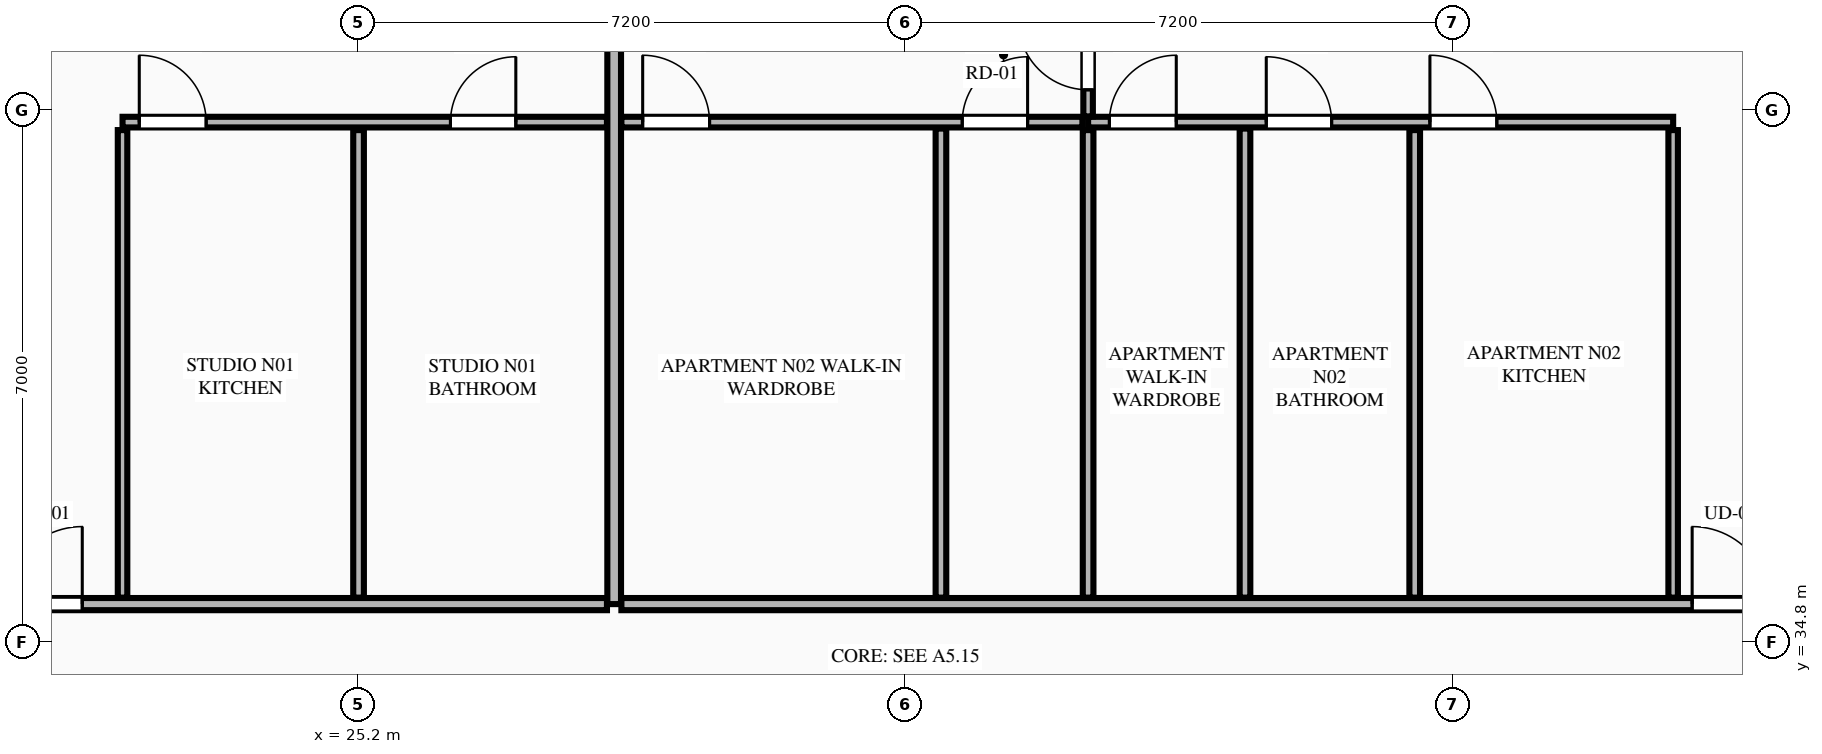
"""IFC4 building model, lengths in metres.
Left out: names, types, materials, properties, quantities, classifications, styles, units other than length and angle.
Written with IfcOpenShell. Run it as: python <this file> out.ifc"""

import sys

from ifc_helpers import new_model, si_unit, direction, frame, frame_2d, origin, place, context, subcontext, project, spatial, rectangle, extrude, element, fill, save


model = new_model("IFC4")
c1 = context("Model", 3, precision=1e-05, world=origin(), true_north=direction((0.0, 1.0)))
c2 = subcontext(c1, "Body", "Model", "MODEL_VIEW")
j1 = project(units=[si_unit("LENGTHUNIT", "METRE"), si_unit("PLANEANGLEUNIT", "RADIAN")], contexts=[c1])
p1 = place(None, origin())
s1 = spatial("IfcSite", under=j1, at=p1, CompositionType="ELEMENT")
p2 = place(p1, origin())
s2 = spatial("IfcBuilding", under=s1, at=p2, CompositionType="ELEMENT")
p3 = place(p2, frame((0.0, 0.0, 137.45)))
s3 = spatial("IfcBuildingStorey", under=s2, at=p3, CompositionType="ELEMENT", Elevation=137.45)
p4 = place(p3, frame((28.568, 35.3, 0.0), z_axis=(0.0, 0.0, 1.0), x_axis=(0.0, 1.0, 0.0)))
e1 = element("IfcWall", 1, at=p4, inside=s3, PredefinedType="PARTITIONING", context=c2, shape_type="SweptSolid", body=[
    extrude(rectangle(XDim=12.195, YDim=0.18, at=frame_2d((6.098, 0.0))), origin(), (0.0, 0.0, 1.0), 2.722),
])
p5 = place(p3, frame((20.145, 35.3, 0.0), z_axis=(0.0, 0.0, 1.0), x_axis=(1.0, 0.0, 0.0)))
e2 = element("IfcWall", 2, at=p5, inside=s3, PredefinedType="PARTITIONING", context=c2, shape_type="SweptSolid", body=[
    extrude(rectangle(XDim=8.328, YDim=0.16, at=frame_2d((4.164, 0.0))), origin(), (0.0, 0.0, 1.0), 3.34),
])
p6 = place(p5, frame((0.405, 0.0, 0.0)))
e3 = element("IfcOpeningElement", 3, at=p6, cuts=e2, PredefinedType="OPENING", context=c2, shape_type="SweptSolid", body=[
    extrude(rectangle(XDim=1.02, YDim=2.25, at=frame_2d((0.51, 1.125))), frame((0.0, 0.09, 0.0), z_axis=(0.0, -1.0, 0.0), x_axis=(1.0, 0.0, 0.0)), (0.0, 0.0, 1.0), 0.18),
])
p7 = place(p3, frame((22.1, 35.385, 0.0), z_axis=(0.0, 0.0, 1.0), x_axis=(0.0, 1.0, 0.0)))
e4 = element("IfcWall", 4, at=p7, inside=s3, PredefinedType="PARTITIONING", context=c2, shape_type="SweptSolid", body=[
    extrude(rectangle(XDim=6.151, YDim=0.125, at=frame_2d((3.075, 0.0))), origin(), (0.0, 0.0, 1.0), 2.722),
])
p8 = place(p3, frame((22.1, 41.641, 0.0), z_axis=(0.0, 0.0, 1.0), x_axis=(1.0, 0.0, 0.0)))
e5 = element("IfcWall", 5, at=p8, inside=s3, PredefinedType="PLUMBINGWALL", context=c2, shape_type="SweptSolid", body=[
    extrude(rectangle(XDim=6.373, YDim=0.14, at=frame_2d((3.187, 0.0))), origin(), (0.0, 0.0, 1.0), 3.34),
])
p9 = place(p8, frame((4.314, 0.0, 0.0)))
e6 = element("IfcOpeningElement", 6, at=p9, cuts=e5, PredefinedType="OPENING", context=c2, shape_type="SweptSolid", body=[
    extrude(rectangle(XDim=0.86, YDim=2.1, at=frame_2d((0.43, 1.05))), frame((0.0, 0.08, 0.0), z_axis=(0.0, -1.0, 0.0), x_axis=(1.0, 0.0, 0.0)), (0.0, 0.0, 1.0), 0.16),
])
p10 = place(p8, frame((0.22, 0.0, 0.0)))
e7 = element("IfcOpeningElement", 7, at=p10, cuts=e5, PredefinedType="OPENING", context=c2, shape_type="SweptSolid", body=[
    extrude(rectangle(XDim=0.88, YDim=2.15, at=frame_2d((0.44, 1.075))), frame((0.0, 0.08, 0.0), z_axis=(0.0, -1.0, 0.0), x_axis=(1.0, 0.0, 0.0)), (0.0, 0.0, 1.0), 0.16),
])
p11 = place(p3, frame((25.205, 35.385, 0.0), z_axis=(0.0, 0.0, 1.0), x_axis=(0.0, 1.0, 0.0)))
e8 = element("IfcWall", 8, at=p11, inside=s3, PredefinedType="PLUMBINGWALL", context=c2, shape_type="SweptSolid", body=[
    extrude(rectangle(XDim=6.151, YDim=0.14, at=frame_2d((3.075, 0.0))), origin(), (0.0, 0.0, 1.0), 3.34),
])
p12 = place(p3, frame((28.663, 35.3, 0.0), z_axis=(0.0, 0.0, 1.0), x_axis=(1.0, 0.0, 0.0)))
e9 = element("IfcWall", 9, at=p12, inside=s3, PredefinedType="PARTITIONING", context=c2, shape_type="SweptSolid", body=[
    extrude(rectangle(XDim=15.992, YDim=0.16, at=frame_2d((7.996, 0.0))), origin(), (0.0, 0.0, 1.0), 3.34),
])
p13 = place(p12, frame((14.087, 0.0, 0.0)))
e10 = element("IfcOpeningElement", 10, at=p13, cuts=e9, PredefinedType="OPENING", context=c2, shape_type="SweptSolid", body=[
    extrude(rectangle(XDim=1.02, YDim=2.25, at=frame_2d((0.51, 1.125))), frame((0.0, 0.09, 0.0), z_axis=(0.0, -1.0, 0.0), x_axis=(1.0, 0.0, 0.0)), (0.0, 0.0, 1.0), 0.18),
])
p14 = place(p3, frame((42.5, 35.385, 0.0), z_axis=(0.0, 0.0, 1.0), x_axis=(0.0, 1.0, 0.0)))
e11 = element("IfcWall", 11, at=p14, inside=s3, PredefinedType="PARTITIONING", context=c2, shape_type="SweptSolid", body=[
    extrude(rectangle(XDim=6.151, YDim=0.125, at=frame_2d((3.075, 0.0))), origin(), (0.0, 0.0, 1.0), 2.722),
])
p15 = place(p3, frame((34.803, 41.641, 0.0), z_axis=(0.0, 0.0, 1.0), x_axis=(1.0, 0.0, 0.0)))
e12 = element("IfcWall", 12, at=p15, inside=s3, PredefinedType="PLUMBINGWALL", context=c2, shape_type="SweptSolid", body=[
    extrude(rectangle(XDim=7.697, YDim=0.14, at=frame_2d((3.849, 0.0))), origin(), (0.0, 0.0, 1.0), 3.34),
])
p16 = place(p15, frame((0.28, 0.0, 0.0)))
e13 = element("IfcOpeningElement", 13, at=p16, cuts=e12, PredefinedType="OPENING", context=c2, shape_type="SweptSolid", body=[
    extrude(rectangle(XDim=0.88, YDim=2.15, at=frame_2d((0.44, 1.075))), frame((0.0, 0.08, 0.0), z_axis=(0.0, -1.0, 0.0), x_axis=(1.0, 0.0, 0.0)), (0.0, 0.0, 1.0), 0.16),
])
p17 = place(p15, frame((2.344, 0.0, 0.0)))
e14 = element("IfcOpeningElement", 14, at=p17, cuts=e12, PredefinedType="OPENING", context=c2, shape_type="SweptSolid", body=[
    extrude(rectangle(XDim=0.86, YDim=2.1, at=frame_2d((0.43, 1.05))), frame((0.0, 0.08, 0.0), z_axis=(0.0, -1.0, 0.0), x_axis=(1.0, 0.0, 0.0)), (0.0, 0.0, 1.0), 0.16),
])
p18 = place(p15, frame((4.497, 0.0, 0.0)))
e15 = element("IfcOpeningElement", 15, at=p18, cuts=e12, PredefinedType="OPENING", context=c2, shape_type="SweptSolid", body=[
    extrude(rectangle(XDim=0.88, YDim=2.15, at=frame_2d((0.44, 1.075))), frame((0.0, 0.08, 0.0), z_axis=(0.0, -1.0, 0.0), x_axis=(1.0, 0.0, 0.0)), (0.0, 0.0, 1.0), 0.16),
])
p19 = place(p3, frame((28.663, 41.641, 0.0), z_axis=(0.0, 0.0, 1.0), x_axis=(1.0, 0.0, 0.0)))
e16 = element("IfcWall", 16, at=p19, inside=s3, PredefinedType="PLUMBINGWALL", context=c2, shape_type="SweptSolid", body=[
    extrude(rectangle(XDim=6.065, YDim=0.14, at=frame_2d((3.032, 0.0))), origin(), (0.0, 0.0, 1.0), 3.34),
])
p20 = place(p19, frame((0.28, 0.0, 0.0)))
e17 = element("IfcOpeningElement", 17, at=p20, cuts=e16, PredefinedType="OPENING", context=c2, shape_type="SweptSolid", body=[
    extrude(rectangle(XDim=0.88, YDim=2.15, at=frame_2d((0.44, 1.075))), frame((0.0, 0.08, 0.0), z_axis=(0.0, -1.0, 0.0), x_axis=(1.0, 0.0, 0.0)), (0.0, 0.0, 1.0), 0.16),
])
p21 = place(p19, frame((4.484, 0.0, 0.0)))
e18 = element("IfcOpeningElement", 18, at=p21, cuts=e16, PredefinedType="OPENING", context=c2, shape_type="SweptSolid", body=[
    extrude(rectangle(XDim=0.86, YDim=2.1, at=frame_2d((0.43, 1.05))), frame((0.0, 0.08, 0.0), z_axis=(0.0, -1.0, 0.0), x_axis=(1.0, 0.0, 0.0)), (0.0, 0.0, 1.0), 0.16),
])
for number, where, z_axis, x_axis in (
    (19, (39.1, 35.385, 0.0), (0.0, 0.0, 1.0), (0.0, 1.0, 0.0)),
    (20, (34.803, 35.385, 0.0), (0.0, 0.0, 1.0), (0.0, 1.0, 0.0)),
):
    element("IfcWall", number, at=place(p3, frame(where, z_axis=z_axis, x_axis=x_axis)), inside=s3, PredefinedType="PLUMBINGWALL", context=c2, shape_type="SweptSolid", body=[
        extrude(rectangle(XDim=6.151, YDim=0.14, at=frame_2d((3.075, 0.0))), origin(), (0.0, 0.0, 1.0), 3.34),
    ])
p22 = place(p3, frame((34.803, 41.716, 0.0), z_axis=(0.0, 0.0, 1.0), x_axis=(0.0, 1.0, 0.0)))
e21 = element("IfcWall", 21, at=p22, inside=s3, PredefinedType="PARTITIONING", context=c2, shape_type="SweptSolid", body=[
    extrude(rectangle(XDim=5.869, YDim=0.125, at=frame_2d((2.935, 0.0))), origin(), (0.0, 0.0, 1.0), 3.34),
])
p23 = place(p22, frame((0.35, 0.0, 0.0)))
e22 = element("IfcOpeningElement", 22, at=p23, cuts=e21, PredefinedType="OPENING", context=c2, shape_type="SweptSolid", body=[
    extrude(rectangle(XDim=0.92, YDim=2.15, at=frame_2d((0.46, 1.075))), frame((0.0, 0.073, 0.0), z_axis=(0.0, -1.0, 0.0), x_axis=(1.0, 0.0, 0.0)), (0.0, 0.0, 1.0), 0.145),
])
for number, where, z_axis, x_axis in (
    (23, (36.867, 35.385, 0.0), (0.0, 0.0, 1.0), (0.0, 1.0, 0.0)),
    (24, (32.867, 35.385, 0.0), (0.0, 0.0, 1.0), (0.0, 1.0, 0.0)),
):
    element("IfcWall", number, at=place(p3, frame(where, z_axis=z_axis, x_axis=x_axis)), inside=s3, PredefinedType="PLUMBINGWALL", context=c2, shape_type="SweptSolid", body=[
        extrude(rectangle(XDim=6.171, YDim=0.14, at=frame_2d((3.085, 0.0))), origin(), (0.0, 0.0, 1.0), 3.34),
    ])
p24 = place(p9, origin())
e25 = element("IfcDoor", 25, at=p24, inside=s3, OperationType="SINGLE_SWING_RIGHT", PredefinedType="DOOR", context=c2, shape_type="SweptSolid", body=[
    extrude(rectangle(XDim=0.86, YDim=2.1, at=frame_2d((0.43, 1.05))), frame((0.0, 0.025, 0.0), z_axis=(0.0, -1.0, 0.0), x_axis=(1.0, 0.0, 0.0)), (0.0, 0.0, 1.0), 0.05),
])
fill(e6, e25)
p25 = place(p6, origin())
e26 = element("IfcDoor", 26, at=p25, inside=s3, OperationType="SINGLE_SWING_RIGHT", PredefinedType="DOOR", context=c2, shape_type="SweptSolid", body=[
    extrude(rectangle(XDim=1.02, YDim=2.25, at=frame_2d((0.51, 1.125))), frame((0.0, 0.025, 0.0), z_axis=(0.0, -1.0, 0.0), x_axis=(1.0, 0.0, 0.0)), (0.0, 0.0, 1.0), 0.05),
])
fill(e3, e26)
p26 = place(p10, origin())
e27 = element("IfcDoor", 27, at=p26, inside=s3, OperationType="SINGLE_SWING_LEFT", PredefinedType="DOOR", context=c2, shape_type="SweptSolid", body=[
    extrude(rectangle(XDim=0.88, YDim=2.15, at=frame_2d((0.44, 1.075))), frame((0.0, 0.025, 0.0), z_axis=(0.0, -1.0, 0.0), x_axis=(1.0, 0.0, 0.0)), (0.0, 0.0, 1.0), 0.05),
])
fill(e7, e27)
p27 = place(p16, origin())
e28 = element("IfcDoor", 28, at=p27, inside=s3, OperationType="SINGLE_SWING_RIGHT", PredefinedType="DOOR", context=c2, shape_type="SweptSolid", body=[
    extrude(rectangle(XDim=0.88, YDim=2.15, at=frame_2d((0.44, 1.075))), frame((0.0, 0.025, 0.0), z_axis=(0.0, -1.0, 0.0), x_axis=(1.0, 0.0, 0.0)), (0.0, 0.0, 1.0), 0.05),
])
fill(e13, e28)
p28 = place(p17, origin())
e29 = element("IfcDoor", 29, at=p28, inside=s3, OperationType="SINGLE_SWING_LEFT", PredefinedType="DOOR", context=c2, shape_type="SweptSolid", body=[
    extrude(rectangle(XDim=0.86, YDim=2.1, at=frame_2d((0.43, 1.05))), frame((0.0, 0.025, 0.0), z_axis=(0.0, -1.0, 0.0), x_axis=(1.0, 0.0, 0.0)), (0.0, 0.0, 1.0), 0.05),
])
fill(e14, e29)
p29 = place(p20, origin())
e30 = element("IfcDoor", 30, at=p29, inside=s3, OperationType="SINGLE_SWING_LEFT", PredefinedType="DOOR", context=c2, shape_type="SweptSolid", body=[
    extrude(rectangle(XDim=0.88, YDim=2.15, at=frame_2d((0.44, 1.075))), frame((0.0, 0.025, 0.0), z_axis=(0.0, -1.0, 0.0), x_axis=(1.0, 0.0, 0.0)), (0.0, 0.0, 1.0), 0.05),
])
fill(e17, e30)
p30 = place(p21, origin())
e31 = element("IfcDoor", 31, at=p30, inside=s3, OperationType="SINGLE_SWING_RIGHT", PredefinedType="DOOR", context=c2, shape_type="SweptSolid", body=[
    extrude(rectangle(XDim=0.86, YDim=2.1, at=frame_2d((0.43, 1.05))), frame((0.0, 0.025, 0.0), z_axis=(0.0, -1.0, 0.0), x_axis=(1.0, 0.0, 0.0)), (0.0, 0.0, 1.0), 0.05),
])
fill(e18, e31)
p31 = place(p13, origin())
e32 = element("IfcDoor", 32, at=p31, inside=s3, OperationType="SINGLE_SWING_LEFT", PredefinedType="DOOR", context=c2, shape_type="SweptSolid", body=[
    extrude(rectangle(XDim=1.02, YDim=2.25, at=frame_2d((0.51, 1.125))), frame((0.0, 0.025, 0.0), z_axis=(0.0, -1.0, 0.0), x_axis=(1.0, 0.0, 0.0)), (0.0, 0.0, 1.0), 0.05),
])
fill(e10, e32)
p32 = place(p18, origin())
e33 = element("IfcDoor", 33, at=p32, inside=s3, OperationType="SINGLE_SWING_LEFT", PredefinedType="DOOR", context=c2, shape_type="SweptSolid", body=[
    extrude(rectangle(XDim=0.88, YDim=2.15, at=frame_2d((0.44, 1.075))), frame((0.0, 0.025, 0.0), z_axis=(0.0, -1.0, 0.0), x_axis=(1.0, 0.0, 0.0)), (0.0, 0.0, 1.0), 0.05),
])
fill(e15, e33)
p33 = place(p23, origin())
e34 = element("IfcDoor", 34, at=p33, inside=s3, OperationType="SINGLE_SWING_RIGHT", PredefinedType="DOOR", context=c2, shape_type="SweptSolid", body=[
    extrude(rectangle(XDim=0.92, YDim=2.15, at=frame_2d((0.46, 1.075))), frame((0.0, 0.025, 0.0), z_axis=(0.0, -1.0, 0.0), x_axis=(1.0, 0.0, 0.0)), (0.0, 0.0, 1.0), 0.05),
])
fill(e22, e34)
save(model, sys.argv[1])
